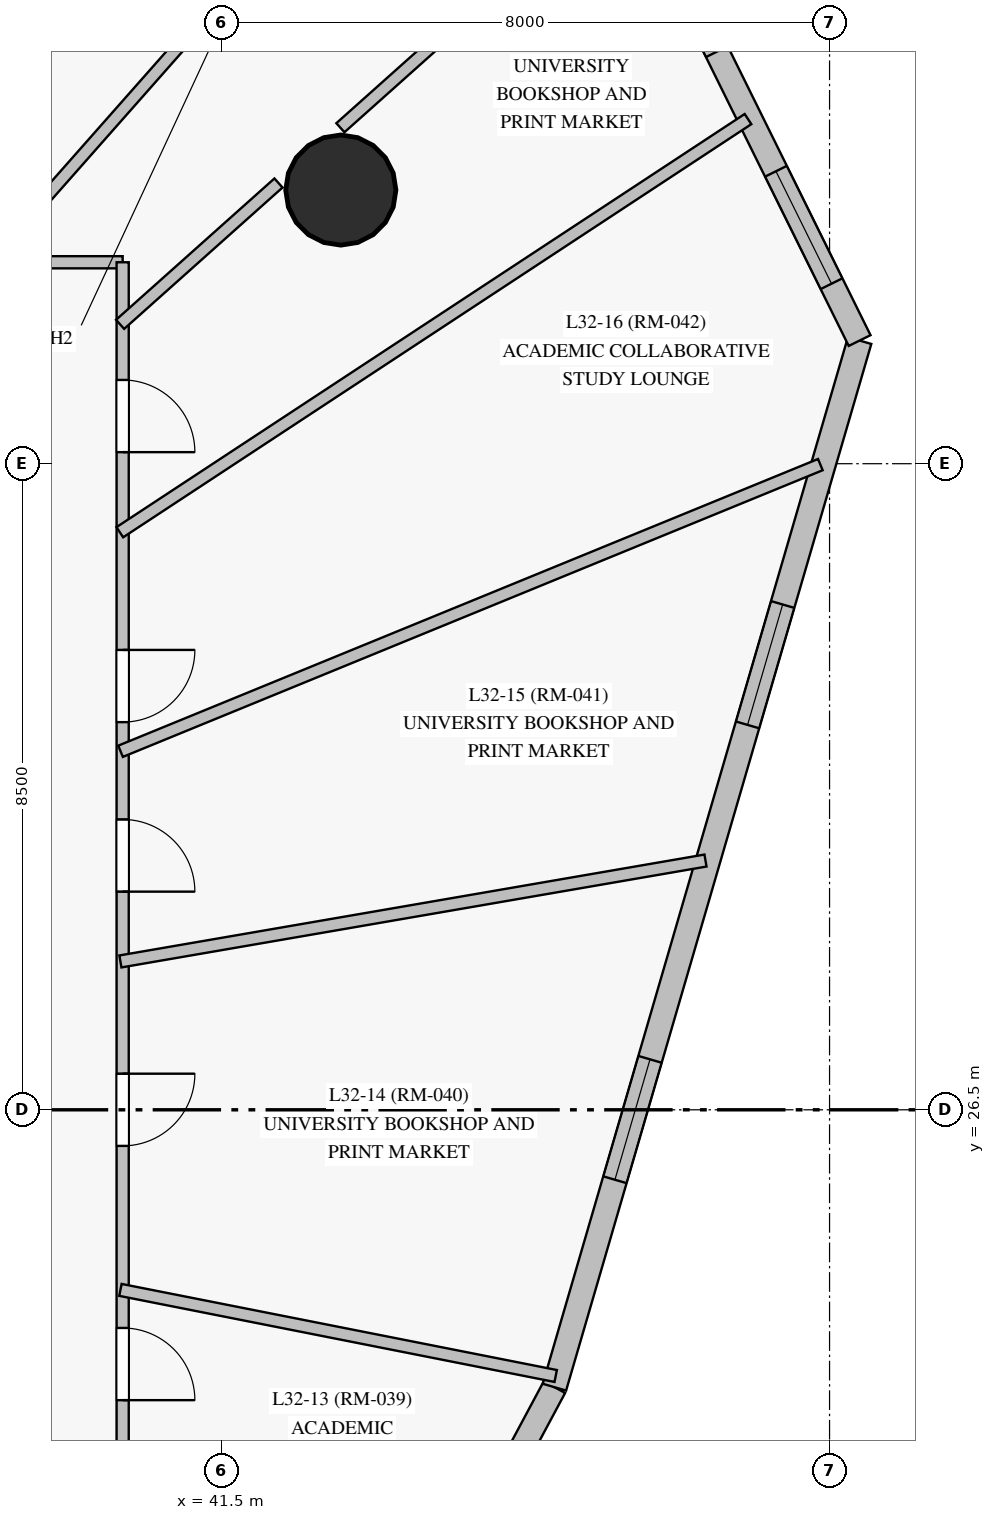
"""IFC4 building model, lengths in metres.
Left out: names, types, materials, properties, quantities, classifications, styles, units other than length and angle.
Written with IfcOpenShell. Run it as: python <this file> out.ifc"""

import sys

from ifc_helpers import new_model, si_unit, direction, frame, frame_2d, origin, origin_with_axes, origin_2d, place, context, subcontext, project, spatial, rectangle, circle, extrude, source, transform, mapped, element, fill, save


model = new_model("IFC4")
c1 = context("Model", 3, precision=1e-05, world=origin(), true_north=direction((0.0, 1.0)))
c2 = subcontext(c1, "Body", "Model", "MODEL_VIEW")
j1 = project(units=[si_unit("LENGTHUNIT", "METRE"), si_unit("PLANEANGLEUNIT", "RADIAN")], contexts=[c1])
p1 = place(None, origin())
s1 = spatial("IfcSite", under=j1, at=p1, CompositionType="ELEMENT")
p2 = place(p1, origin())
s2 = spatial("IfcBuilding", under=s1, at=p2, CompositionType="ELEMENT")
p3 = place(p2, frame((0.0, 0.0, 117.55)))
s3 = spatial("IfcBuildingStorey", under=s2, at=p3, CompositionType="ELEMENT", Elevation=117.55)
m1 = source(origin_with_axes(), c2, "Body", "SweptSolid", [
    extrude(circle(Radius=0.725, at=origin_2d()), origin(), (0.0, 0.0, 1.0), 3.05),
])
p4 = place(p3, frame((43.07, 38.6, 0.0), z_axis=(0.0, 0.0, 1.0), x_axis=(1.0, 0.0, 0.0)))
e1 = element("IfcColumn", 1, at=p4, inside=s3, PredefinedType="COLUMN", context=c2, shape_type="MappedRepresentation", body=[
    mapped(m1, transform((0.0, 0.0, 0.0), scale=1.0)),
])
p5 = place(p3, frame((41.175, 14.061, 0.0), z_axis=(0.0, 0.0, 1.0), x_axis=(0.471938707329, 0.881631360902, 0.0)))
e2 = element("IfcWall", 2, at=p5, inside=s3, PredefinedType="SOLIDWALL", context=c2, shape_type="SweptSolid", body=[
    extrude(rectangle(XDim=9.97, YDim=0.32, at=frame_2d((4.985, 0.0))), origin(), (0.0, 0.0, 1.0), 2.825),
])
p6 = place(p5, frame((3.309, 0.0, 0.85)))
e3 = element("IfcOpeningElement", 3, at=p6, cuts=e2, PredefinedType="OPENING", context=c2, shape_type="SweptSolid", body=[
    extrude(rectangle(XDim=1.65, YDim=1.65, at=frame_2d((0.825, 0.825))), frame((0.0, 0.17, 0.0), z_axis=(0.0, -1.0, 0.0), x_axis=(1.0, 0.0, 0.0)), (0.0, 0.0, 1.0), 0.34),
])
p7 = place(p5, frame((6.947, 0.0, 0.85)))
e4 = element("IfcOpeningElement", 4, at=p7, cuts=e2, PredefinedType="OPENING", context=c2, shape_type="SweptSolid", body=[
    extrude(rectangle(XDim=1.65, YDim=1.65, at=frame_2d((0.825, 0.825))), frame((0.0, 0.17, 0.0), z_axis=(0.0, -1.0, 0.0), x_axis=(1.0, 0.0, 0.0)), (0.0, 0.0, 1.0), 0.34),
])
p8 = place(p3, frame((45.88, 22.851, 0.0), z_axis=(0.0, 0.0, 1.0), x_axis=(0.279941825512, 0.960016965647, 0.0)))
e5 = element("IfcWall", 5, at=p8, inside=s3, PredefinedType="SOLIDWALL", context=c2, shape_type="SweptSolid", body=[
    extrude(rectangle(XDim=14.343, YDim=0.32, at=frame_2d((7.171, 0.0))), origin(), (0.0, 0.0, 1.0), 2.825),
])
p9 = place(p8, frame((2.843, 0.0, 0.85)))
e6 = element("IfcOpeningElement", 6, at=p9, cuts=e5, PredefinedType="OPENING", context=c2, shape_type="SweptSolid", body=[
    extrude(rectangle(XDim=1.65, YDim=1.65, at=frame_2d((0.825, 0.825))), frame((0.0, 0.17, 0.0), z_axis=(0.0, -1.0, 0.0), x_axis=(1.0, 0.0, 0.0)), (0.0, 0.0, 1.0), 0.34),
])
p10 = place(p8, frame((9.076, 0.0, 0.85)))
e7 = element("IfcOpeningElement", 7, at=p10, cuts=e5, PredefinedType="OPENING", context=c2, shape_type="SweptSolid", body=[
    extrude(rectangle(XDim=1.65, YDim=1.65, at=frame_2d((0.825, 0.825))), frame((0.0, 0.17, 0.0), z_axis=(0.0, -1.0, 0.0), x_axis=(1.0, 0.0, 0.0)), (0.0, 0.0, 1.0), 0.34),
])
p11 = place(p3, frame((49.896, 36.62, 0.0), z_axis=(0.0, 0.0, 1.0), x_axis=(-0.443101896888, 0.896471253847, 0.0)))
e8 = element("IfcWall", 8, at=p11, inside=s3, PredefinedType="SOLIDWALL", context=c2, shape_type="SweptSolid", body=[
    extrude(rectangle(XDim=9.606, YDim=0.32, at=frame_2d((4.803, 0.0))), origin(), (0.0, 0.0, 1.0), 2.825),
])
p12 = place(p11, frame((0.834, 0.0, 0.85)))
e9 = element("IfcOpeningElement", 9, at=p12, cuts=e8, PredefinedType="OPENING", context=c2, shape_type="SweptSolid", body=[
    extrude(rectangle(XDim=1.65, YDim=1.65, at=frame_2d((0.825, 0.825))), frame((0.0, 0.17, 0.0), z_axis=(0.0, -1.0, 0.0), x_axis=(1.0, 0.0, 0.0)), (0.0, 0.0, 1.0), 0.34),
])
p13 = place(p11, frame((4.239, 0.0, 0.85)))
e10 = element("IfcOpeningElement", 10, at=p13, cuts=e8, PredefinedType="OPENING", context=c2, shape_type="SweptSolid", body=[
    extrude(rectangle(XDim=1.65, YDim=1.65, at=frame_2d((0.825, 0.825))), frame((0.0, 0.17, 0.0), z_axis=(0.0, -1.0, 0.0), x_axis=(1.0, 0.0, 0.0)), (0.0, 0.0, 1.0), 0.34),
])
p14 = place(p11, frame((7.383, 0.0, 0.85)))
e11 = element("IfcOpeningElement", 11, at=p14, cuts=e8, PredefinedType="OPENING", context=c2, shape_type="SweptSolid", body=[
    extrude(rectangle(XDim=1.65, YDim=1.65, at=frame_2d((0.825, 0.825))), frame((0.0, 0.17, 0.0), z_axis=(0.0, -1.0, 0.0), x_axis=(1.0, 0.0, 0.0)), (0.0, 0.0, 1.0), 0.34),
])
p15 = place(p3, frame((16.7, 37.65, 0.0), z_axis=(0.0, 0.0, 1.0), x_axis=(1.0, 0.0, 0.0)))
e12 = element("IfcWall", 12, at=p15, inside=s3, PredefinedType="PARTITIONING", context=c2, shape_type="SweptSolid", body=[
    extrude(rectangle(XDim=23.5, YDim=0.16, at=frame_2d((11.75, 0.0))), origin(), (0.0, 0.0, 1.0), 2.325),
])
p16 = place(p15, frame((20.526, 0.0, 0.0)))
e13 = element("IfcOpeningElement", 13, at=p16, cuts=e12, PredefinedType="OPENING", context=c2, shape_type="SweptSolid", body=[
    extrude(rectangle(XDim=0.95, YDim=2.15, at=frame_2d((0.475, 1.075))), frame((0.0, 0.09, 0.0), z_axis=(0.0, -1.0, 0.0), x_axis=(1.0, 0.0, 0.0)), (0.0, 0.0, 1.0), 0.18),
])
p17 = place(p15, frame((17.997, 0.0, 0.0)))
e14 = element("IfcOpeningElement", 14, at=p17, cuts=e12, PredefinedType="OPENING", context=c2, shape_type="SweptSolid", body=[
    extrude(rectangle(XDim=0.95, YDim=2.15, at=frame_2d((0.475, 1.075))), frame((0.0, 0.09, 0.0), z_axis=(0.0, -1.0, 0.0), x_axis=(1.0, 0.0, 0.0)), (0.0, 0.0, 1.0), 0.18),
])
p18 = place(p15, frame((14.26, 0.0, 0.0)))
e15 = element("IfcOpeningElement", 15, at=p18, cuts=e12, PredefinedType="OPENING", context=c2, shape_type="SweptSolid", body=[
    extrude(rectangle(XDim=0.95, YDim=2.15, at=frame_2d((0.475, 1.075))), frame((0.0, 0.09, 0.0), z_axis=(0.0, -1.0, 0.0), x_axis=(1.0, 0.0, 0.0)), (0.0, 0.0, 1.0), 0.18),
])
p19 = place(p15, frame((13.256, 0.0, 0.0)))
e16 = element("IfcOpeningElement", 16, at=p19, cuts=e12, PredefinedType="OPENING", context=c2, shape_type="SweptSolid", body=[
    extrude(rectangle(XDim=0.86, YDim=2.1, at=frame_2d((0.43, 1.05))), frame((0.0, 0.09, 0.0), z_axis=(0.0, -1.0, 0.0), x_axis=(1.0, 0.0, 0.0)), (0.0, 0.0, 1.0), 0.18),
])
p20 = place(p15, frame((11.56, 0.0, 0.0)))
e17 = element("IfcOpeningElement", 17, at=p20, cuts=e12, PredefinedType="OPENING", context=c2, shape_type="SweptSolid", body=[
    extrude(rectangle(XDim=0.95, YDim=2.15, at=frame_2d((0.475, 1.075))), frame((0.0, 0.09, 0.0), z_axis=(0.0, -1.0, 0.0), x_axis=(1.0, 0.0, 0.0)), (0.0, 0.0, 1.0), 0.18),
])
p21 = place(p15, frame((9.635, 0.0, 0.0)))
e18 = element("IfcOpeningElement", 18, at=p21, cuts=e12, PredefinedType="OPENING", context=c2, shape_type="SweptSolid", body=[
    extrude(rectangle(XDim=0.95, YDim=2.15, at=frame_2d((0.475, 1.075))), frame((0.0, 0.09, 0.0), z_axis=(0.0, -1.0, 0.0), x_axis=(1.0, 0.0, 0.0)), (0.0, 0.0, 1.0), 0.18),
])
p22 = place(p15, frame((7.922, 0.0, 0.0)))
e19 = element("IfcOpeningElement", 19, at=p22, cuts=e12, PredefinedType="OPENING", context=c2, shape_type="SweptSolid", body=[
    extrude(rectangle(XDim=0.95, YDim=2.15, at=frame_2d((0.475, 1.075))), frame((0.0, 0.09, 0.0), z_axis=(0.0, -1.0, 0.0), x_axis=(1.0, 0.0, 0.0)), (0.0, 0.0, 1.0), 0.18),
])
p23 = place(p15, frame((6.81, 0.0, 0.0)))
e20 = element("IfcOpeningElement", 20, at=p23, cuts=e12, PredefinedType="OPENING", context=c2, shape_type="SweptSolid", body=[
    extrude(rectangle(XDim=0.95, YDim=2.15, at=frame_2d((0.475, 1.075))), frame((0.0, 0.09, 0.0), z_axis=(0.0, -1.0, 0.0), x_axis=(1.0, 0.0, 0.0)), (0.0, 0.0, 1.0), 0.18),
])
p24 = place(p15, frame((2.856, 0.0, 0.0)))
e21 = element("IfcOpeningElement", 21, at=p24, cuts=e12, PredefinedType="OPENING", context=c2, shape_type="SweptSolid", body=[
    extrude(rectangle(XDim=0.95, YDim=2.15, at=frame_2d((0.475, 1.075))), frame((0.0, 0.09, 0.0), z_axis=(0.0, -1.0, 0.0), x_axis=(1.0, 0.0, 0.0)), (0.0, 0.0, 1.0), 0.18),
])
p25 = place(p3, frame((40.2, 37.65, 0.0), z_axis=(0.0, 0.0, 1.0), x_axis=(0.0, -1.0, 0.0)))
e22 = element("IfcWall", 22, at=p25, inside=s3, PredefinedType="PARTITIONING", context=c2, shape_type="SweptSolid", body=[
    extrude(rectangle(XDim=22.3, YDim=0.16, at=frame_2d((11.15, 0.0))), origin(), (0.0, 0.0, 1.0), 2.325),
])
p26 = place(p25, frame((14.02, 0.0, 0.0)))
e23 = element("IfcOpeningElement", 23, at=p26, cuts=e22, PredefinedType="OPENING", context=c2, shape_type="SweptSolid", body=[
    extrude(rectangle(XDim=0.95, YDim=2.15, at=frame_2d((0.475, 1.075))), frame((0.0, 0.09, 0.0), z_axis=(0.0, -1.0, 0.0), x_axis=(1.0, 0.0, 0.0)), (0.0, 0.0, 1.0), 0.18),
])
p27 = place(p25, frame((10.675, 0.0, 0.0)))
e24 = element("IfcOpeningElement", 24, at=p27, cuts=e22, PredefinedType="OPENING", context=c2, shape_type="SweptSolid", body=[
    extrude(rectangle(XDim=0.95, YDim=2.15, at=frame_2d((0.475, 1.075))), frame((0.0, 0.09, 0.0), z_axis=(0.0, -1.0, 0.0), x_axis=(1.0, 0.0, 0.0)), (0.0, 0.0, 1.0), 0.18),
])
p28 = place(p25, frame((7.33, 0.0, 0.0)))
e25 = element("IfcOpeningElement", 25, at=p28, cuts=e22, PredefinedType="OPENING", context=c2, shape_type="SweptSolid", body=[
    extrude(rectangle(XDim=0.95, YDim=2.15, at=frame_2d((0.475, 1.075))), frame((0.0, 0.09, 0.0), z_axis=(0.0, -1.0, 0.0), x_axis=(1.0, 0.0, 0.0)), (0.0, 0.0, 1.0), 0.18),
])
p29 = place(p25, frame((5.1, 0.0, 0.0)))
e26 = element("IfcOpeningElement", 26, at=p29, cuts=e22, PredefinedType="OPENING", context=c2, shape_type="SweptSolid", body=[
    extrude(rectangle(XDim=0.95, YDim=2.15, at=frame_2d((0.475, 1.075))), frame((0.0, 0.09, 0.0), z_axis=(0.0, -1.0, 0.0), x_axis=(1.0, 0.0, 0.0)), (0.0, 0.0, 1.0), 0.18),
])
p30 = place(p25, frame((1.548, 0.0, 0.0)))
e27 = element("IfcOpeningElement", 27, at=p30, cuts=e22, PredefinedType="OPENING", context=c2, shape_type="SweptSolid", body=[
    extrude(rectangle(XDim=0.95, YDim=2.15, at=frame_2d((0.475, 1.075))), frame((0.0, 0.09, 0.0), z_axis=(0.0, -1.0, 0.0), x_axis=(1.0, 0.0, 0.0)), (0.0, 0.0, 1.0), 0.18),
])
p31 = place(p3, frame((35.904, 37.613, 0.0), z_axis=(0.0, 0.0, 1.0), x_axis=(0.550742924519, 0.8346749254, 0.0)))
e28 = element("IfcWall", 28, at=p31, inside=s3, PredefinedType="PARTITIONING", context=c2, shape_type="SweptSolid", body=[
    extrude(rectangle(XDim=10.894, YDim=0.16, at=frame_2d((5.447, 0.0))), origin(), (0.0, 0.0, 1.0), 2.825),
])
p32 = place(p3, frame((38.401, 37.616, 0.0), z_axis=(0.0, 0.0, 1.0), x_axis=(0.662096599454, 0.749418503236, 0.0)))
e29 = element("IfcWall", 29, at=p32, inside=s3, PredefinedType="PARTITIONING", context=c2, shape_type="SweptSolid", body=[
    extrude(rectangle(XDim=10.333, YDim=0.16, at=frame_2d((5.167, 0.0))), origin(), (0.0, 0.0, 1.0), 2.825),
])
p33 = place(p32, frame((4.737, 0.0, 0.0)))
e30 = element("IfcOpeningElement", 30, at=p33, cuts=e29, PredefinedType="OPENING", context=c2, shape_type="SweptSolid", body=[
    extrude(rectangle(XDim=0.86, YDim=2.04, at=frame_2d((0.43, 1.02))), frame((0.0, 0.09, 0.0), z_axis=(0.0, -1.0, 0.0), x_axis=(1.0, 0.0, 0.0)), (0.0, 0.0, 1.0), 0.18),
])
p34 = place(p3, frame((40.172, 31.217, 0.0), z_axis=(0.0, 0.0, 1.0), x_axis=(0.925368222218, 0.379069457103, 0.0)))
e31 = element("IfcWall", 31, at=p34, inside=s3, PredefinedType="PARTITIONING", context=c2, shape_type="SweptSolid", body=[
    extrude(rectangle(XDim=9.949, YDim=0.16, at=frame_2d((4.975, 0.0))), origin(), (0.0, 0.0, 1.0), 2.825),
])
p35 = place(p3, frame((40.162, 34.098, 0.0), z_axis=(0.0, 0.0, 1.0), x_axis=(0.835508327982, 0.549477782874, 0.0)))
e32 = element("IfcWall", 32, at=p35, inside=s3, PredefinedType="PARTITIONING", context=c2, shape_type="SweptSolid", body=[
    extrude(rectangle(XDim=9.892, YDim=0.16, at=frame_2d((4.946, 0.0))), origin(), (0.0, 0.0, 1.0), 2.825),
])
p36 = place(p3, frame((40.17, 28.452, 0.0), z_axis=(0.0, 0.0, 1.0), x_axis=(0.985455062454, 0.169936222987, 0.0)))
e33 = element("IfcWall", 33, at=p36, inside=s3, PredefinedType="PARTITIONING", context=c2, shape_type="SweptSolid", body=[
    extrude(rectangle(XDim=7.811, YDim=0.16, at=frame_2d((3.906, 0.0))), origin(), (0.0, 0.0, 1.0), 2.825),
])
p37 = place(p3, frame((40.171, 24.131, 0.0), z_axis=(0.0, 0.0, 1.0), x_axis=(0.980996692058, -0.194024457662, 0.0)))
e34 = element("IfcWall", 34, at=p37, inside=s3, PredefinedType="PARTITIONING", context=c2, shape_type="SweptSolid", body=[
    extrude(rectangle(XDim=5.837, YDim=0.16, at=frame_2d((2.918, 0.0))), origin(), (0.0, 0.0, 1.0), 2.825),
])
p38 = place(p3, frame((43.064, 39.42, 0.0), z_axis=(0.0, 0.0, 1.0), x_axis=(0.746022776511, 0.665920428374, 0.0)))
e35 = element("IfcWall", 35, at=p38, inside=s3, PredefinedType="PARTITIONING", context=c2, shape_type="SweptSolid", body=[
    extrude(rectangle(XDim=5.038, YDim=0.16, at=frame_2d((2.519, 0.0))), origin(), (0.0, 0.0, 1.0), 2.825),
])
p39 = place(p3, frame((40.167, 36.833, 0.0), z_axis=(0.0, 0.0, 1.0), x_axis=(0.746009004767, 0.665935856376, 0.0)))
e36 = element("IfcWall", 36, at=p39, inside=s3, PredefinedType="PARTITIONING", context=c2, shape_type="SweptSolid", body=[
    extrude(rectangle(XDim=2.793, YDim=0.16, at=frame_2d((1.396, 0.0))), origin(), (0.0, 0.0, 1.0), 2.225),
])
m2 = source(origin_with_axes(), c2, "Body", "SweptSolid", [
    extrude(rectangle(XDim=1.65, YDim=1.65, at=frame_2d((0.825, 0.825))), frame((0.0, 0.03, 0.0), z_axis=(0.0, -1.0, 0.0), x_axis=(1.0, 0.0, 0.0)), (0.0, 0.0, 1.0), 0.06),
])
p40 = place(p9, origin())
e37 = element("IfcWindow", 37, at=p40, inside=s3, PartitioningType="SINGLE_PANEL", PredefinedType="WINDOW", context=c2, shape_type="MappedRepresentation", body=[
    mapped(m2, transform((0.0, 0.0, 0.0), scale=1.0)),
])
fill(e6, e37)
p41 = place(p10, origin())
e38 = element("IfcWindow", 38, at=p41, inside=s3, PartitioningType="SINGLE_PANEL", PredefinedType="WINDOW", context=c2, shape_type="MappedRepresentation", body=[
    mapped(m2, transform((0.0, 0.0, 0.0), scale=1.0)),
])
fill(e7, e38)
p42 = place(p12, origin())
e39 = element("IfcWindow", 39, at=p42, inside=s3, PartitioningType="SINGLE_PANEL", PredefinedType="WINDOW", context=c2, shape_type="MappedRepresentation", body=[
    mapped(m2, transform((0.0, 0.0, 0.0), scale=1.0)),
])
fill(e9, e39)
p43 = place(p13, origin())
e40 = element("IfcWindow", 40, at=p43, inside=s3, PartitioningType="SINGLE_PANEL", PredefinedType="WINDOW", context=c2, shape_type="MappedRepresentation", body=[
    mapped(m2, transform((0.0, 0.0, 0.0), scale=1.0)),
])
fill(e10, e40)
m3 = source(origin_with_axes(), c2, "Body", "SweptSolid", [
    extrude(rectangle(XDim=0.95, YDim=2.15, at=frame_2d((0.475, 1.075))), frame((0.0, 0.025, 0.0), z_axis=(0.0, -1.0, 0.0), x_axis=(1.0, 0.0, 0.0)), (0.0, 0.0, 1.0), 0.05),
])
p44 = place(p26, origin())
e41 = element("IfcDoor", 41, at=p44, inside=s3, OperationType="SINGLE_SWING_RIGHT", PredefinedType="DOOR", context=c2, shape_type="MappedRepresentation", body=[
    mapped(m3, transform((0.0, 0.0, 0.0), scale=1.0)),
])
fill(e23, e41)
p45 = place(p27, origin())
e42 = element("IfcDoor", 42, at=p45, inside=s3, OperationType="SINGLE_SWING_LEFT", PredefinedType="DOOR", context=c2, shape_type="MappedRepresentation", body=[
    mapped(m3, transform((0.0, 0.0, 0.0), scale=1.0)),
])
fill(e24, e42)
p46 = place(p28, origin())
e43 = element("IfcDoor", 43, at=p46, inside=s3, OperationType="SINGLE_SWING_RIGHT", PredefinedType="DOOR", context=c2, shape_type="MappedRepresentation", body=[
    mapped(m3, transform((0.0, 0.0, 0.0), scale=1.0)),
])
fill(e25, e43)
p47 = place(p29, origin())
e44 = element("IfcDoor", 44, at=p47, inside=s3, OperationType="SINGLE_SWING_LEFT", PredefinedType="DOOR", context=c2, shape_type="MappedRepresentation", body=[
    mapped(m3, transform((0.0, 0.0, 0.0), scale=1.0)),
])
fill(e26, e44)
p48 = place(p30, origin())
e45 = element("IfcDoor", 45, at=p48, inside=s3, OperationType="SINGLE_SWING_RIGHT", PredefinedType="DOOR", context=c2, shape_type="MappedRepresentation", body=[
    mapped(m3, transform((0.0, 0.0, 0.0), scale=1.0)),
])
fill(e27, e45)
save(model, sys.argv[1])
